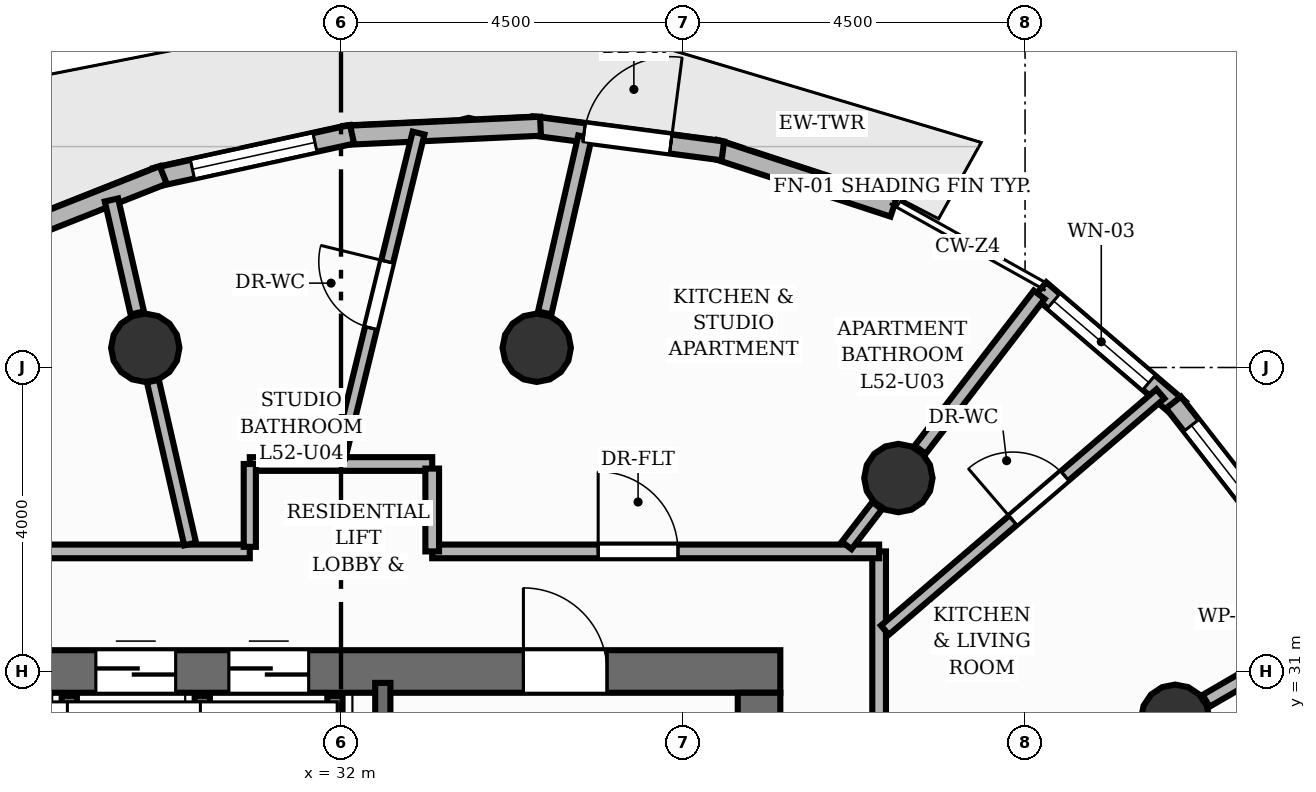
"""IFC4 building model, lengths in metres.
Left out: names, types, materials, properties, quantities, classifications, styles, units other than length and angle.
Written with IfcOpenShell. Run it as: python <this file> out.ifc"""

import sys

from ifc_helpers import new_model, si_unit, direction, frame, frame_2d, origin, origin_2d, place, context, subcontext, project, spatial, rectangle, circle, extrude, element, fill, save


model = new_model("IFC4")
c1 = context("Model", 3, precision=1e-05, world=origin(), true_north=direction((0.0, 1.0)))
c2 = subcontext(c1, "Body", "Model", "MODEL_VIEW")
j1 = project(units=[si_unit("LENGTHUNIT", "METRE"), si_unit("PLANEANGLEUNIT", "RADIAN")], contexts=[c1])
p1 = place(None, origin())
s1 = spatial("IfcSite", under=j1, at=p1, CompositionType="ELEMENT")
p2 = place(p1, origin())
s2 = spatial("IfcBuilding", under=s1, at=p2, CompositionType="ELEMENT")
p3 = place(p2, frame((0.0, 0.0, 175.84)))
s3 = spatial("IfcBuildingStorey", under=s2, at=p3, CompositionType="ELEMENT", Elevation=175.84)
p4 = place(p3, frame((26.22, 31.0, 0.0), z_axis=(0.0, 0.0, 1.0), x_axis=(1.0, 0.0, 0.0)))
e1 = element("IfcWall", 1, at=p4, inside=s3, PredefinedType="SHEAR", context=c2, shape_type="SweptSolid", body=[
    extrude(rectangle(XDim=11.56, YDim=0.56, at=frame_2d((5.78, 0.0))), origin(), (0.0, 0.0, 1.0), 3.2),
])
p5 = place(p4, frame((8.18, 0.0, 0.0)))
e2 = element("IfcOpeningElement", 2, at=p5, cuts=e1, PredefinedType="OPENING", context=c2, shape_type="SweptSolid", body=[
    extrude(rectangle(XDim=1.1, YDim=2.15, at=frame_2d((0.55, 1.075))), frame((0.0, 0.29, 0.0), z_axis=(0.0, -1.0, 0.0), x_axis=(1.0, 0.0, 0.0)), (0.0, 0.0, 1.0), 0.58),
])
p6 = place(p4, frame((0.805, 0.0, 0.0)))
e3 = element("IfcOpeningElement", 3, at=p6, cuts=e1, PredefinedType="OPENING", context=c2, shape_type="SweptSolid", body=[
    extrude(rectangle(XDim=1.05, YDim=2.15, at=frame_2d((0.525, 1.075))), frame((0.0, 0.29, 0.0), z_axis=(0.0, -1.0, 0.0), x_axis=(1.0, 0.0, 0.0)), (0.0, 0.0, 1.0), 0.58),
])
p7 = place(p4, frame((2.555, 0.0, 0.0)))
e4 = element("IfcOpeningElement", 4, at=p7, cuts=e1, PredefinedType="OPENING", context=c2, shape_type="SweptSolid", body=[
    extrude(rectangle(XDim=1.05, YDim=2.15, at=frame_2d((0.525, 1.075))), frame((0.0, 0.29, 0.0), z_axis=(0.0, -1.0, 0.0), x_axis=(1.0, 0.0, 0.0)), (0.0, 0.0, 1.0), 0.58),
])
p8 = place(p4, frame((4.305, 0.0, 0.0)))
e5 = element("IfcOpeningElement", 5, at=p8, cuts=e1, PredefinedType="OPENING", context=c2, shape_type="SweptSolid", body=[
    extrude(rectangle(XDim=1.05, YDim=2.15, at=frame_2d((0.525, 1.075))), frame((0.0, 0.29, 0.0), z_axis=(0.0, -1.0, 0.0), x_axis=(1.0, 0.0, 0.0)), (0.0, 0.0, 1.0), 0.58),
])
p9 = place(p3, frame((37.5, 17.28, 0.0), z_axis=(0.0, 0.0, 1.0), x_axis=(0.0, 1.0, 0.0)))
e6 = element("IfcWall", 6, at=p9, inside=s3, PredefinedType="SHEAR", context=c2, shape_type="SweptSolid", body=[
    extrude(rectangle(XDim=13.44, YDim=0.56, at=frame_2d((6.72, 0.0))), origin(), (0.0, 0.0, 1.0), 3.2),
])
for number, where, z_axis, x_axis in (
    (7, (42.975, 30.378, 0.0), (0.0, 0.0, 1.0), (1.0, 0.0, 0.0)),
    (8, (39.333, 33.545, 0.0), (0.0, 0.0, 1.0), (1.0, 0.0, 0.0)),
    (9, (34.575, 35.26, 0.0), (0.0, 0.0, 1.0), (1.0, 0.0, 0.0)),
    (10, (29.425, 35.26, 0.0), (0.0, 0.0, 1.0), (1.0, 0.0, 0.0)),
):
    element("IfcColumn", number, at=place(p3, frame(where, z_axis=z_axis, x_axis=x_axis)), inside=s3, PredefinedType="COLUMN", context=c2, shape_type="SweptSolid", body=[
        extrude(circle(Radius=0.45, at=origin_2d()), origin(), (0.0, 0.0, 1.0), 3.2),
    ])
p10 = place(p3, frame((41.198, 36.027, 0.0), z_axis=(0.0, 0.0, 1.0), x_axis=(0.759591927835, -0.65039995631, 0.0)))
e11 = element("IfcWall", 11, at=p10, inside=s3, PredefinedType="SOLIDWALL", context=c2, shape_type="SweptSolid", body=[
    extrude(rectangle(XDim=2.415, YDim=0.25, at=frame_2d((1.208, 0.0))), origin(), (0.0, 0.0, 1.0), 2.96),
])
p11 = place(p10, frame((0.234, 0.0, 0.85)))
e12 = element("IfcOpeningElement", 12, at=p11, cuts=e11, PredefinedType="OPENING", context=c2, shape_type="SweptSolid", body=[
    extrude(rectangle(XDim=1.65, YDim=1.52, at=frame_2d((0.825, 0.76))), frame((0.0, 0.135, 0.0), z_axis=(0.0, -1.0, 0.0), x_axis=(1.0, 0.0, 0.0)), (0.0, 0.0, 1.0), 0.27),
])
p12 = place(p3, frame((36.914, 37.875, 0.0), z_axis=(0.0, 0.0, 1.0), x_axis=(0.950422545433, -0.310961388491, 0.0)))
e13 = element("IfcWall", 13, at=p12, inside=s3, PredefinedType="SOLIDWALL", context=c2, shape_type="SweptSolid", body=[
    extrude(rectangle(XDim=2.478, YDim=0.25, at=frame_2d((1.239, 0.0))), origin(), (0.0, 0.0, 1.0), 2.96),
])
p13 = place(p3, frame((34.513, 38.179, 0.0), z_axis=(0.0, 0.0, 1.0), x_axis=(0.991491995227, -0.130167674176, 0.0)))
e14 = element("IfcWall", 14, at=p13, inside=s3, PredefinedType="SOLIDWALL", context=c2, shape_type="SweptSolid", body=[
    extrude(rectangle(XDim=2.532, YDim=0.25, at=frame_2d((1.266, 0.0))), origin(), (0.0, 0.0, 1.0), 2.96),
])
p14 = place(p13, frame((0.691, 0.0, 0.0)))
e15 = element("IfcOpeningElement", 15, at=p14, cuts=e14, PredefinedType="OPENING", context=c2, shape_type="SweptSolid", body=[
    extrude(rectangle(XDim=1.15, YDim=2.2, at=frame_2d((0.575, 1.1))), frame((0.0, 0.135, 0.0), z_axis=(0.0, -1.0, 0.0), x_axis=(1.0, 0.0, 0.0)), (0.0, 0.0, 1.0), 0.27),
])
p15 = place(p3, frame((32.036, 38.053, 0.0), z_axis=(0.0, 0.0, 1.0), x_axis=(0.998912652492, 0.046620946915, 0.0)))
e16 = element("IfcWall", 16, at=p15, inside=s3, PredefinedType="SOLIDWALL", context=c2, shape_type="SweptSolid", body=[
    extrude(rectangle(XDim=2.592, YDim=0.25, at=frame_2d((1.296, 0.0))), origin(), (0.0, 0.0, 1.0), 2.96),
])
p16 = place(p3, frame((29.556, 37.501, 0.0), z_axis=(0.0, 0.0, 1.0), x_axis=(0.976886196324, 0.213760051067, 0.0)))
e17 = element("IfcWall", 17, at=p16, inside=s3, PredefinedType="SOLIDWALL", context=c2, shape_type="SweptSolid", body=[
    extrude(rectangle(XDim=2.651, YDim=0.25, at=frame_2d((1.325, 0.0))), origin(), (0.0, 0.0, 1.0), 2.96),
])
p17 = place(p16, frame((0.501, 0.0, 0.85)))
e18 = element("IfcOpeningElement", 18, at=p17, cuts=e17, PredefinedType="OPENING", context=c2, shape_type="SweptSolid", body=[
    extrude(rectangle(XDim=1.65, YDim=1.55, at=frame_2d((0.825, 0.775))), frame((0.0, 0.135, 0.0), z_axis=(0.0, -1.0, 0.0), x_axis=(1.0, 0.0, 0.0)), (0.0, 0.0, 1.0), 0.27),
])
p18 = place(p3, frame((27.149, 36.538, 0.0), z_axis=(0.0, 0.0, 1.0), x_axis=(0.929693178164, 0.368334894459, 0.0)))
e19 = element("IfcWall", 19, at=p18, inside=s3, PredefinedType="SOLIDWALL", context=c2, shape_type="SweptSolid", body=[
    extrude(rectangle(XDim=2.702, YDim=0.25, at=frame_2d((1.351, 0.0))), origin(), (0.0, 0.0, 1.0), 2.96),
])
p19 = place(p3, frame((42.953, 34.539, 0.0), z_axis=(0.0, 0.0, 1.0), x_axis=(0.61468225386, -0.788774826417, 0.0)))
e20 = element("IfcWall", 20, at=p19, inside=s3, PredefinedType="SOLIDWALL", context=c2, shape_type="SweptSolid", body=[
    extrude(rectangle(XDim=2.415, YDim=0.25, at=frame_2d((1.208, 0.0))), origin(), (0.0, 0.0, 1.0), 2.96),
])
p20 = place(p19, frame((0.382, 0.0, 0.85)))
e21 = element("IfcOpeningElement", 21, at=p20, cuts=e20, PredefinedType="OPENING", context=c2, shape_type="SweptSolid", body=[
    extrude(rectangle(XDim=1.65, YDim=1.55, at=frame_2d((0.825, 0.775))), frame((0.0, 0.135, 0.0), z_axis=(0.0, -1.0, 0.0), x_axis=(1.0, 0.0, 0.0)), (0.0, 0.0, 1.0), 0.27),
])
p21 = place(p3, frame((32.55, 27.35, 0.0), z_axis=(0.0, 0.0, 1.0), x_axis=(0.0, 1.0, 0.0)))
e22 = element("IfcWall", 22, at=p21, inside=s3, PredefinedType="SHEAR", context=c2, shape_type="SweptSolid", body=[
    extrude(rectangle(XDim=3.5, YDim=0.2, at=frame_2d((1.75, 0.0))), origin(), (0.0, 0.0, 1.0), 3.2),
])
for number, where, z_axis, x_axis in (
    (23, (31.92, 29.02, 0.0), (0.0, 0.0, 1.0), (0.0, 1.0, 0.0)),
    (24, (28.425, 29.02, 0.0), (0.0, 0.0, 1.0), (0.0, 1.0, 0.0)),
    (25, (30.175, 29.02, 0.0), (0.0, 0.0, 1.0), (0.0, 1.0, 0.0)),
):
    element("IfcWall", number, at=place(p3, frame(where, z_axis=z_axis, x_axis=x_axis)), inside=s3, PredefinedType="SHEAR", context=c2, shape_type="SweptSolid", body=[
        extrude(rectangle(XDim=1.66, YDim=0.2, at=frame_2d((0.83, 0.0))), origin(), (0.0, 0.0, 1.0), 3.2),
    ])
p22 = place(p3, frame((43.382, 30.614, 0.0), z_axis=(0.0, 0.0, 1.0), x_axis=(0.86456661279, 0.502518230563, 0.0)))
e26 = element("IfcWall", 26, at=p22, inside=s3, PredefinedType="PARTITIONING", context=c2, shape_type="SweptSolid", body=[
    extrude(rectangle(XDim=1.785, YDim=0.18, at=frame_2d((0.893, 0.0))), origin(), (0.0, 0.0, 1.0), 2.403),
])
p23 = place(p3, frame((39.62, 33.918, 0.0), z_axis=(0.0, 0.0, 1.0), x_axis=(0.609164681512, 0.793043750873, 0.0)))
e27 = element("IfcWall", 27, at=p23, inside=s3, PredefinedType="PARTITIONING", context=c2, shape_type="SweptSolid", body=[
    extrude(rectangle(XDim=2.572, YDim=0.18, at=frame_2d((1.286, 0.0))), origin(), (0.0, 0.0, 1.0), 2.403),
])
p24 = place(p3, frame((34.68, 35.718, 0.0), z_axis=(0.0, 0.0, 1.0), x_axis=(0.223011847659, 0.974815734282, 0.0)))
e28 = element("IfcWall", 28, at=p24, inside=s3, PredefinedType="PARTITIONING", context=c2, shape_type="SweptSolid", body=[
    extrude(rectangle(XDim=2.375, YDim=0.18, at=frame_2d((1.187, 0.0))), origin(), (0.0, 0.0, 1.0), 2.403),
])
p25 = place(p3, frame((29.32, 35.718, 0.0), z_axis=(0.0, 0.0, 1.0), x_axis=(-0.222976920769, 0.974823723965, 0.0)))
e29 = element("IfcWall", 29, at=p25, inside=s3, PredefinedType="PARTITIONING", context=c2, shape_type="SweptSolid", body=[
    extrude(rectangle(XDim=1.525, YDim=0.18, at=frame_2d((0.763, 0.0))), origin(), (0.0, 0.0, 1.0), 2.403),
])
p26 = place(p3, frame((39.08, 32.58, 0.0), z_axis=(0.0, 0.0, 1.0), x_axis=(0.0, -1.0, 0.0)))
e30 = element("IfcWall", 30, at=p26, inside=s3, PredefinedType="PARTITIONING", context=c2, shape_type="SweptSolid", body=[
    extrude(rectangle(XDim=4.468, YDim=0.18, at=frame_2d((2.234, 0.0))), origin(), (0.0, 0.0, 1.0), 2.955),
])
p27 = place(p26, frame((2.246, 0.0, 0.0)))
e31 = element("IfcOpeningElement", 31, at=p27, cuts=e30, PredefinedType="OPENING", context=c2, shape_type="SweptSolid", body=[
    extrude(rectangle(XDim=1.05, YDim=2.15, at=frame_2d((0.525, 1.075))), frame((0.0, 0.1, 0.0), z_axis=(0.0, -1.0, 0.0), x_axis=(1.0, 0.0, 0.0)), (0.0, 0.0, 1.0), 0.2),
])
p28 = place(p3, frame((33.2, 32.58, 0.0), z_axis=(0.0, 0.0, 1.0), x_axis=(1.0, 0.0, 0.0)))
e32 = element("IfcWall", 32, at=p28, inside=s3, PredefinedType="PARTITIONING", context=c2, shape_type="SweptSolid", body=[
    extrude(rectangle(XDim=5.88, YDim=0.18, at=frame_2d((2.94, 0.0))), origin(), (0.0, 0.0, 1.0), 2.955),
])
p29 = place(p28, frame((2.184, 0.0, 0.0)))
e33 = element("IfcOpeningElement", 33, at=p29, cuts=e32, PredefinedType="OPENING", context=c2, shape_type="SweptSolid", body=[
    extrude(rectangle(XDim=1.05, YDim=2.15, at=frame_2d((0.525, 1.075))), frame((0.0, 0.1, 0.0), z_axis=(0.0, -1.0, 0.0), x_axis=(1.0, 0.0, 0.0)), (0.0, 0.0, 1.0), 0.2),
])
p30 = place(p3, frame((30.8, 33.73, 0.0), z_axis=(0.0, 0.0, 1.0), x_axis=(1.0, 0.0, 0.0)))
e34 = element("IfcWall", 34, at=p30, inside=s3, PredefinedType="PARTITIONING", context=c2, shape_type="SweptSolid", body=[
    extrude(rectangle(XDim=2.4, YDim=0.18, at=frame_2d((1.2, 0.0))), origin(), (0.0, 0.0, 1.0), 2.955),
])
p31 = place(p3, frame((33.2, 33.67, 0.0), z_axis=(0.0, 0.0, 1.0), x_axis=(0.0, -1.0, 0.0)))
e35 = element("IfcWall", 35, at=p31, inside=s3, PredefinedType="PARTITIONING", context=c2, shape_type="SweptSolid", body=[
    extrude(rectangle(XDim=1.09, YDim=0.18, at=frame_2d((0.545, 0.0))), origin(), (0.0, 0.0, 1.0), 2.955),
])
p32 = place(p3, frame((24.92, 32.58, 0.0), z_axis=(0.0, 0.0, 1.0), x_axis=(1.0, 0.0, 0.0)))
e36 = element("IfcWall", 36, at=p32, inside=s3, PredefinedType="PARTITIONING", context=c2, shape_type="SweptSolid", body=[
    extrude(rectangle(XDim=5.88, YDim=0.18, at=frame_2d((2.94, 0.0))), origin(), (0.0, 0.0, 1.0), 2.955),
])
p33 = place(p3, frame((30.8, 32.64, 0.0), z_axis=(0.0, 0.0, 1.0), x_axis=(0.0, 1.0, 0.0)))
e37 = element("IfcWall", 37, at=p33, inside=s3, PredefinedType="PLUMBINGWALL", context=c2, shape_type="SweptSolid", body=[
    extrude(rectangle(XDim=1.09, YDim=0.16, at=frame_2d((0.545, 0.0))), origin(), (0.0, 0.0, 1.0), 2.955),
])
p34 = place(p3, frame((39.156, 31.544, 0.0), z_axis=(0.0, 0.0, 1.0), x_axis=(0.759083333315, 0.650993466238, 0.0)))
e38 = element("IfcWall", 38, at=p34, inside=s3, PredefinedType="PLUMBINGWALL", context=c2, shape_type="SweptSolid", body=[
    extrude(rectangle(XDim=4.775, YDim=0.16, at=frame_2d((2.387, 0.0))), origin(), (0.0, 0.0, 1.0), 2.955),
])
p35 = place(p34, frame((2.217, 0.0, 0.0)))
e39 = element("IfcOpeningElement", 39, at=p35, cuts=e38, PredefinedType="OPENING", context=c2, shape_type="SweptSolid", body=[
    extrude(rectangle(XDim=0.9, YDim=2.1, at=frame_2d((0.45, 1.05))), frame((0.0, 0.09, 0.0), z_axis=(0.0, -1.0, 0.0), x_axis=(1.0, 0.0, 0.0)), (0.0, 0.0, 1.0), 0.18),
])
p36 = place(p3, frame((38.653, 32.659, 0.0), z_axis=(0.0, 0.0, 1.0), x_axis=(0.609101063055, 0.79309261438, 0.0)))
e40 = element("IfcWall", 40, at=p36, inside=s3, PredefinedType="PLUMBINGWALL", context=c2, shape_type="SweptSolid", body=[
    extrude(rectangle(XDim=0.658, YDim=0.16, at=frame_2d((0.329, 0.0))), origin(), (0.0, 0.0, 1.0), 2.403),
])
p37 = place(p3, frame((31.981, 33.827, 0.0), z_axis=(0.0, 0.0, 1.0), x_axis=(0.237157525666, 0.971471208024, 0.0)))
e41 = element("IfcWall", 41, at=p37, inside=s3, PredefinedType="PLUMBINGWALL", context=c2, shape_type="SweptSolid", body=[
    extrude(rectangle(XDim=4.382, YDim=0.16, at=frame_2d((2.191, 0.0))), origin(), (0.0, 0.0, 1.0), 2.955),
])
p38 = place(p37, frame((1.741, 0.0, 0.0)))
e42 = element("IfcOpeningElement", 42, at=p38, cuts=e41, PredefinedType="OPENING", context=c2, shape_type="SweptSolid", body=[
    extrude(rectangle(XDim=0.9, YDim=2.1, at=frame_2d((0.45, 1.05))), frame((0.0, 0.09, 0.0), z_axis=(0.0, -1.0, 0.0), x_axis=(1.0, 0.0, 0.0)), (0.0, 0.0, 1.0), 0.18),
])
p39 = place(p3, frame((30.015, 32.677, 0.0), z_axis=(0.0, 0.0, 1.0), x_axis=(-0.222969522248, 0.974825416241, 0.0)))
e43 = element("IfcWall", 43, at=p39, inside=s3, PredefinedType="PLUMBINGWALL", context=c2, shape_type="SweptSolid", body=[
    extrude(rectangle(XDim=2.199, YDim=0.16, at=frame_2d((1.099, 0.0))), origin(), (0.0, 0.0, 1.0), 2.403),
])
p40 = place(p14, origin())
e44 = element("IfcDoor", 44, at=p40, inside=s3, OperationType="SINGLE_SWING_RIGHT", PredefinedType="DOOR", context=c2, shape_type="SweptSolid", body=[
    extrude(rectangle(XDim=1.15, YDim=2.2, at=frame_2d((0.575, 1.1))), frame((0.0, 0.025, 0.0), z_axis=(0.0, -1.0, 0.0), x_axis=(1.0, 0.0, 0.0)), (0.0, 0.0, 1.0), 0.05),
])
fill(e15, e44)
p41 = place(p11, origin())
e45 = element("IfcWindow", 45, at=p41, inside=s3, PartitioningType="SINGLE_PANEL", PredefinedType="WINDOW", context=c2, shape_type="SweptSolid", body=[
    extrude(rectangle(XDim=1.65, YDim=1.52, at=frame_2d((0.825, 0.76))), frame((0.0, 0.03, 0.0), z_axis=(0.0, -1.0, 0.0), x_axis=(1.0, 0.0, 0.0)), (0.0, 0.0, 1.0), 0.06),
])
fill(e12, e45)
p42 = place(p17, origin())
e46 = element("IfcWindow", 46, at=p42, inside=s3, PartitioningType="SINGLE_PANEL", PredefinedType="WINDOW", context=c2, shape_type="SweptSolid", body=[
    extrude(rectangle(XDim=1.65, YDim=1.55, at=frame_2d((0.825, 0.775))), frame((0.0, 0.03, 0.0), z_axis=(0.0, -1.0, 0.0), x_axis=(1.0, 0.0, 0.0)), (0.0, 0.0, 1.0), 0.06),
])
fill(e18, e46)
p43 = place(p20, origin())
e47 = element("IfcWindow", 47, at=p43, inside=s3, PartitioningType="SINGLE_PANEL", PredefinedType="WINDOW", context=c2, shape_type="SweptSolid", body=[
    extrude(rectangle(XDim=1.65, YDim=1.55, at=frame_2d((0.825, 0.775))), frame((0.0, 0.03, 0.0), z_axis=(0.0, -1.0, 0.0), x_axis=(1.0, 0.0, 0.0)), (0.0, 0.0, 1.0), 0.06),
])
fill(e21, e47)
p44 = place(p5, origin())
e48 = element("IfcDoor", 48, at=p44, inside=s3, OperationType="SINGLE_SWING_LEFT", PredefinedType="DOOR", context=c2, shape_type="SweptSolid", body=[
    extrude(rectangle(XDim=1.1, YDim=2.15, at=frame_2d((0.55, 1.075))), frame((0.0, 0.025, 0.0), z_axis=(0.0, -1.0, 0.0), x_axis=(1.0, 0.0, 0.0)), (0.0, 0.0, 1.0), 0.05),
])
fill(e2, e48)
p45 = place(p7, origin())
e49 = element("IfcDoor", 49, at=p45, inside=s3, OperationType="DOUBLE_DOOR_SLIDING", PredefinedType="DOOR", context=c2, shape_type="SweptSolid", body=[
    extrude(rectangle(XDim=1.05, YDim=2.15, at=frame_2d((0.525, 1.075))), frame((0.0, 0.025, 0.0), z_axis=(0.0, -1.0, 0.0), x_axis=(1.0, 0.0, 0.0)), (0.0, 0.0, 1.0), 0.05),
])
fill(e4, e49)
p46 = place(p8, origin())
e50 = element("IfcDoor", 50, at=p46, inside=s3, OperationType="DOUBLE_DOOR_SLIDING", PredefinedType="DOOR", context=c2, shape_type="SweptSolid", body=[
    extrude(rectangle(XDim=1.05, YDim=2.15, at=frame_2d((0.525, 1.075))), frame((0.0, 0.025, 0.0), z_axis=(0.0, -1.0, 0.0), x_axis=(1.0, 0.0, 0.0)), (0.0, 0.0, 1.0), 0.05),
])
fill(e5, e50)
p47 = place(p35, origin())
e51 = element("IfcDoor", 51, at=p47, inside=s3, OperationType="SINGLE_SWING_LEFT", PredefinedType="DOOR", context=c2, shape_type="SweptSolid", body=[
    extrude(rectangle(XDim=0.9, YDim=2.1, at=frame_2d((0.45, 1.05))), frame((0.0, 0.025, 0.0), z_axis=(0.0, -1.0, 0.0), x_axis=(1.0, 0.0, 0.0)), (0.0, 0.0, 1.0), 0.05),
])
fill(e39, e51)
p48 = place(p29, origin())
e52 = element("IfcDoor", 52, at=p48, inside=s3, OperationType="SINGLE_SWING_LEFT", PredefinedType="DOOR", context=c2, shape_type="SweptSolid", body=[
    extrude(rectangle(XDim=1.05, YDim=2.15, at=frame_2d((0.525, 1.075))), frame((0.0, 0.025, 0.0), z_axis=(0.0, -1.0, 0.0), x_axis=(1.0, 0.0, 0.0)), (0.0, 0.0, 1.0), 0.05),
])
fill(e33, e52)
p49 = place(p38, origin())
e53 = element("IfcDoor", 53, at=p49, inside=s3, OperationType="SINGLE_SWING_RIGHT", PredefinedType="DOOR", context=c2, shape_type="SweptSolid", body=[
    extrude(rectangle(XDim=0.9, YDim=2.1, at=frame_2d((0.45, 1.05))), frame((0.0, 0.025, 0.0), z_axis=(0.0, -1.0, 0.0), x_axis=(1.0, 0.0, 0.0)), (0.0, 0.0, 1.0), 0.05),
])
fill(e42, e53)
save(model, sys.argv[1])
